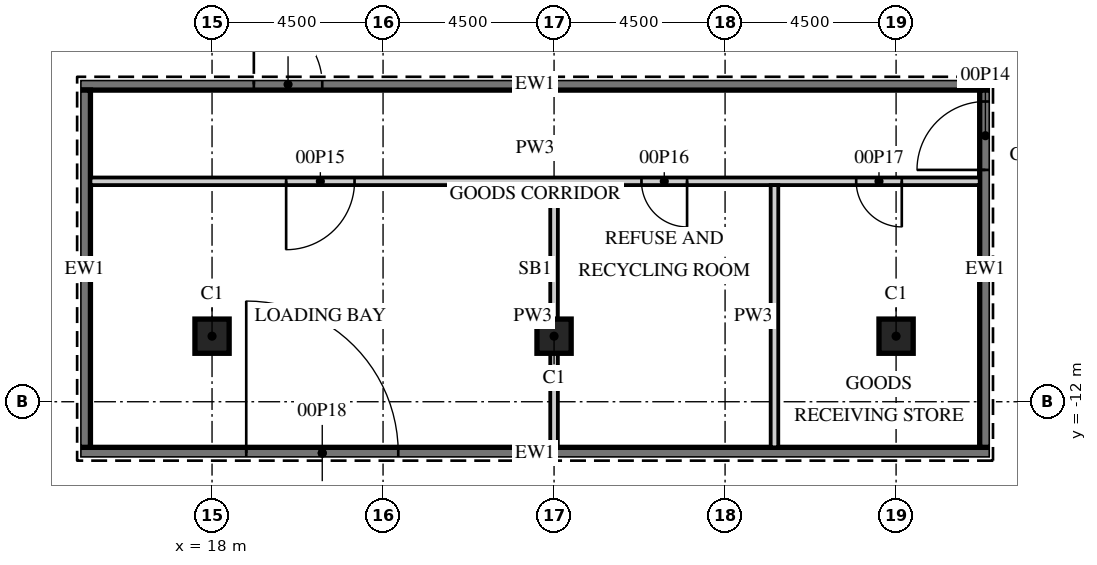
"""IFC4 building model, lengths in metres.
Left out: names, types, materials, properties, quantities, classifications, styles, units other than length and angle.
Written with IfcOpenShell. Run it as: python <this file> out.ifc"""

import sys

from ifc_helpers import new_model, si_unit, direction, frame, frame_2d, origin, origin_2d, place, context, subcontext, project, spatial, rectangle, extrude, element, fill, save


model = new_model("IFC4")
c1 = context("Model", 3, precision=1e-05, world=origin(), true_north=direction((0.0, 1.0)))
c2 = subcontext(c1, "Body", "Model", "MODEL_VIEW")
j1 = project(units=[si_unit("LENGTHUNIT", "METRE"), si_unit("PLANEANGLEUNIT", "RADIAN")], contexts=[c1])
p1 = place(None, origin())
s1 = spatial("IfcSite", under=j1, at=p1, CompositionType="ELEMENT")
p2 = place(p1, origin())
s2 = spatial("IfcBuilding", under=s1, at=p2, CompositionType="ELEMENT")
p3 = place(p2, origin())
s3 = spatial("IfcBuildingStorey", under=s2, at=p3, CompositionType="ELEMENT", Elevation=0.0)
for number, where, z_axis, x_axis in (
    (1, (18.0, -10.275, -0.5), (0.0, 0.0, 1.0), (1.0, 0.0, 0.0)),
    (2, (27.0, -10.275, -0.5), (0.0, 0.0, 1.0), (1.0, 0.0, 0.0)),
    (3, (36.0, -10.275, -0.5), (0.0, 0.0, 1.0), (1.0, 0.0, 0.0)),
):
    element("IfcColumn", number, at=place(p3, frame(where, z_axis=z_axis, x_axis=x_axis)), inside=s3, PredefinedType="COLUMN", context=c2, shape_type="SweptSolid", body=[
        extrude(rectangle(XDim=0.9, YDim=0.9, at=origin_2d()), origin(), (0.0, 0.0, 1.0), 11.5),
    ])
p4 = place(p3, frame((14.5, -3.65, 0.0), z_axis=(0.0, 0.0, 1.0), x_axis=(1.0, 0.0, 0.0)))
e4 = element("IfcWall", 4, at=p4, inside=s3, PredefinedType="SOLIDWALL", context=c2, shape_type="SweptSolid", body=[
    extrude(rectangle(XDim=24.0, YDim=0.3, at=frame_2d((12.0, 0.0))), origin(), (0.0, 0.0, 1.0), 10.55),
])
p5 = place(p4, frame((4.6, 0.0, 0.0)))
e5 = element("IfcOpeningElement", 5, at=p5, cuts=e4, PredefinedType="OPENING", context=c2, shape_type="SweptSolid", body=[
    extrude(rectangle(XDim=1.8, YDim=2.1, at=frame_2d((0.9, 1.05))), frame((0.0, 0.16, 0.0), z_axis=(0.0, -1.0, 0.0), x_axis=(1.0, 0.0, 0.0)), (0.0, 0.0, 1.0), 0.32),
])
p6 = place(p3, frame((14.5, -13.35, 0.0), z_axis=(0.0, 0.0, 1.0), x_axis=(1.0, 0.0, 0.0)))
e6 = element("IfcWall", 6, at=p6, inside=s3, PredefinedType="SOLIDWALL", context=c2, shape_type="SweptSolid", body=[
    extrude(rectangle(XDim=24.0, YDim=0.3, at=frame_2d((12.0, 0.0))), origin(), (0.0, 0.0, 1.0), 10.55),
])
p7 = place(p6, frame((4.4, 0.0, 0.0)))
e7 = element("IfcOpeningElement", 7, at=p7, cuts=e6, PredefinedType="OPENING", context=c2, shape_type="SweptSolid", body=[
    extrude(rectangle(XDim=4.0, YDim=4.5, at=frame_2d((2.0, 2.25))), frame((0.0, 0.16, 0.0), z_axis=(0.0, -1.0, 0.0), x_axis=(1.0, 0.0, 0.0)), (0.0, 0.0, 1.0), 0.32),
])
p8 = place(p3, frame((14.65, -13.2, 0.0), z_axis=(0.0, 0.0, 1.0), x_axis=(0.0, 1.0, 0.0)))
e8 = element("IfcWall", 8, at=p8, inside=s3, PredefinedType="SOLIDWALL", context=c2, shape_type="SweptSolid", body=[
    extrude(rectangle(XDim=9.4, YDim=0.3, at=frame_2d((4.7, 0.0))), origin(), (0.0, 0.0, 1.0), 10.55),
])
p9 = place(p3, frame((38.35, -13.2, 0.0), z_axis=(0.0, 0.0, 1.0), x_axis=(0.0, 1.0, 0.0)))
e9 = element("IfcWall", 9, at=p9, inside=s3, PredefinedType="SOLIDWALL", context=c2, shape_type="SweptSolid", body=[
    extrude(rectangle(XDim=9.4, YDim=0.3, at=frame_2d((4.7, 0.0))), origin(), (0.0, 0.0, 1.0), 10.55),
])
p10 = place(p9, frame((7.3, 0.0, 0.0)))
e10 = element("IfcOpeningElement", 10, at=p10, cuts=e9, PredefinedType="OPENING", context=c2, shape_type="SweptSolid", body=[
    extrude(rectangle(XDim=1.8, YDim=2.1, at=frame_2d((0.9, 1.05))), frame((0.0, 0.16, 0.0), z_axis=(0.0, -1.0, 0.0), x_axis=(1.0, 0.0, 0.0)), (0.0, 0.0, 1.0), 0.32),
])
p11 = place(p3, frame((14.8, -6.2, 0.0), z_axis=(0.0, 0.0, 1.0), x_axis=(1.0, 0.0, 0.0)))
e11 = element("IfcWall", 11, at=p11, inside=s3, PredefinedType="PARTITIONING", context=c2, shape_type="SweptSolid", body=[
    extrude(rectangle(XDim=23.4, YDim=0.2, at=frame_2d((11.7, 0.0))), origin(), (0.0, 0.0, 1.0), 10.55),
])
p12 = place(p11, frame((5.15, 0.0, 0.0)))
e12 = element("IfcOpeningElement", 12, at=p12, cuts=e11, PredefinedType="OPENING", context=c2, shape_type="SweptSolid", body=[
    extrude(rectangle(XDim=1.8, YDim=2.1, at=frame_2d((0.9, 1.05))), frame((0.0, 0.11, 0.0), z_axis=(0.0, -1.0, 0.0), x_axis=(1.0, 0.0, 0.0)), (0.0, 0.0, 1.0), 0.22),
])
p13 = place(p11, frame((14.5, 0.0, 0.0)))
e13 = element("IfcOpeningElement", 13, at=p13, cuts=e11, PredefinedType="OPENING", context=c2, shape_type="SweptSolid", body=[
    extrude(rectangle(XDim=1.2, YDim=2.1, at=frame_2d((0.6, 1.05))), frame((0.0, 0.11, 0.0), z_axis=(0.0, -1.0, 0.0), x_axis=(1.0, 0.0, 0.0)), (0.0, 0.0, 1.0), 0.22),
])
p14 = place(p11, frame((20.15, 0.0, 0.0)))
e14 = element("IfcOpeningElement", 14, at=p14, cuts=e11, PredefinedType="OPENING", context=c2, shape_type="SweptSolid", body=[
    extrude(rectangle(XDim=1.2, YDim=2.1, at=frame_2d((0.6, 1.05))), frame((0.0, 0.11, 0.0), z_axis=(0.0, -1.0, 0.0), x_axis=(1.0, 0.0, 0.0)), (0.0, 0.0, 1.0), 0.22),
])
for number, where, z_axis, x_axis in (
    (15, (27.0, -13.2, 0.0), (0.0, 0.0, 1.0), (0.0, 1.0, 0.0)),
    (16, (32.8, -13.2, 0.0), (0.0, 0.0, 1.0), (0.0, 1.0, 0.0)),
):
    element("IfcWall", number, at=place(p3, frame(where, z_axis=z_axis, x_axis=x_axis)), inside=s3, PredefinedType="PARTITIONING", context=c2, shape_type="SweptSolid", body=[
        extrude(rectangle(XDim=6.9, YDim=0.2, at=frame_2d((3.45, 0.0))), origin(), (0.0, 0.0, 1.0), 10.55),
    ])
p15 = place(p5, origin())
e17 = element("IfcDoor", 17, at=p15, inside=s3, OperationType="DOUBLE_DOOR_DOUBLE_SWING", PredefinedType="DOOR", context=c2, shape_type="SweptSolid", body=[
    extrude(rectangle(XDim=1.8, YDim=2.1, at=frame_2d((0.9, 1.05))), frame((0.0, 0.025, 0.0), z_axis=(0.0, -1.0, 0.0), x_axis=(1.0, 0.0, 0.0)), (0.0, 0.0, 1.0), 0.05),
])
fill(e5, e17)
p16 = place(p10, origin())
e18 = element("IfcDoor", 18, at=p16, inside=s3, OperationType="DOUBLE_DOOR_DOUBLE_SWING", PredefinedType="DOOR", context=c2, shape_type="SweptSolid", body=[
    extrude(rectangle(XDim=1.8, YDim=2.1, at=frame_2d((0.9, 1.05))), frame((0.0, 0.025, 0.0), z_axis=(0.0, -1.0, 0.0), x_axis=(1.0, 0.0, 0.0)), (0.0, 0.0, 1.0), 0.05),
])
fill(e10, e18)
p17 = place(p12, origin())
e19 = element("IfcDoor", 19, at=p17, inside=s3, OperationType="DOUBLE_DOOR_DOUBLE_SWING", PredefinedType="DOOR", context=c2, shape_type="SweptSolid", body=[
    extrude(rectangle(XDim=1.8, YDim=2.1, at=frame_2d((0.9, 1.05))), frame((0.0, 0.025, 0.0), z_axis=(0.0, -1.0, 0.0), x_axis=(1.0, 0.0, 0.0)), (0.0, 0.0, 1.0), 0.05),
])
fill(e12, e19)
p18 = place(p13, origin())
e20 = element("IfcDoor", 20, at=p18, inside=s3, OperationType="SINGLE_SWING_RIGHT", PredefinedType="DOOR", context=c2, shape_type="SweptSolid", body=[
    extrude(rectangle(XDim=1.2, YDim=2.1, at=frame_2d((0.6, 1.05))), frame((0.0, 0.025, 0.0), z_axis=(0.0, -1.0, 0.0), x_axis=(1.0, 0.0, 0.0)), (0.0, 0.0, 1.0), 0.05),
])
fill(e13, e20)
p19 = place(p14, origin())
e21 = element("IfcDoor", 21, at=p19, inside=s3, OperationType="SINGLE_SWING_RIGHT", PredefinedType="DOOR", context=c2, shape_type="SweptSolid", body=[
    extrude(rectangle(XDim=1.2, YDim=2.1, at=frame_2d((0.6, 1.05))), frame((0.0, 0.025, 0.0), z_axis=(0.0, -1.0, 0.0), x_axis=(1.0, 0.0, 0.0)), (0.0, 0.0, 1.0), 0.05),
])
fill(e14, e21)
p20 = place(p7, origin())
e22 = element("IfcDoor", 22, at=p20, inside=s3, OperationType="SINGLE_SWING_LEFT", PredefinedType="DOOR", context=c2, shape_type="SweptSolid", body=[
    extrude(rectangle(XDim=4.0, YDim=4.5, at=frame_2d((2.0, 2.25))), frame((0.0, 0.025, 0.0), z_axis=(0.0, -1.0, 0.0), x_axis=(1.0, 0.0, 0.0)), (0.0, 0.0, 1.0), 0.05),
])
fill(e7, e22)
save(model, sys.argv[1])
